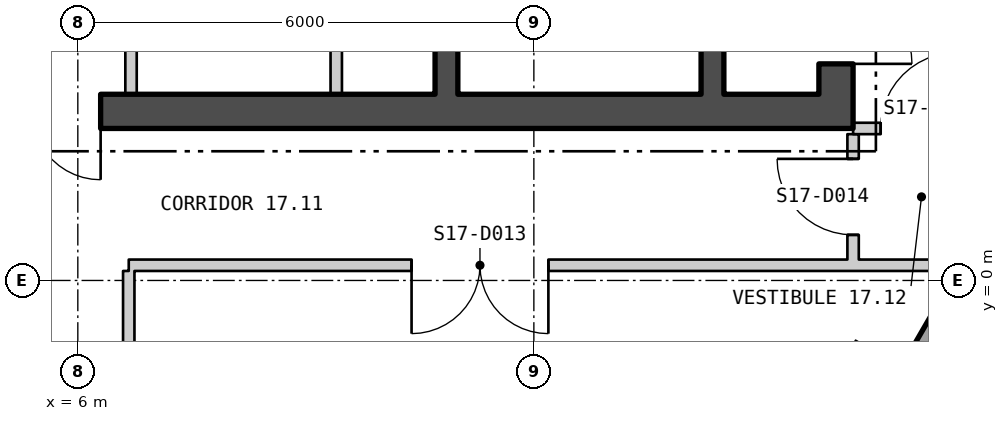
"""IFC4 building model, lengths in metres.
Left out: names, types, materials, properties, quantities, classifications, styles, units other than length and angle.
Written with IfcOpenShell. Run it as: python <this file> out.ifc"""

import sys

from ifc_helpers import new_model, si_unit, direction, frame, frame_2d, origin, origin_2d, place, context, subcontext, project, spatial, polyline, rectangle, hollow_rectangle, outline, extrude, element, fill, save


model = new_model("IFC4")
c1 = context("Model", 3, precision=1e-05, world=origin(), true_north=direction((0.0, 1.0)))
c2 = subcontext(c1, "Body", "Model", "MODEL_VIEW")
j1 = project(units=[si_unit("LENGTHUNIT", "METRE"), si_unit("PLANEANGLEUNIT", "RADIAN")], contexts=[c1])
p1 = place(None, origin())
s1 = spatial("IfcSite", under=j1, at=p1, CompositionType="ELEMENT")
p2 = place(p1, origin())
s2 = spatial("IfcBuilding", under=s1, at=p2, CompositionType="ELEMENT")
p3 = place(p2, frame((0.0, 0.0, 227.7)))
s3 = spatial("IfcBuildingStorey", under=s2, at=p3, CompositionType="ELEMENT", Elevation=227.7)
p4 = place(p3, frame((16.398, -1.196, 0.0), z_axis=(0.0, 0.0, 1.0), x_axis=(0.5, 0.866025403784, 0.0)))
e1 = element("IfcColumn", 1, at=p4, inside=s3, PredefinedType="COLUMN", context=c2, shape_type="SweptSolid", body=[
    extrude(hollow_rectangle(XDim=0.55, YDim=0.7, WallThickness=0.05, at=origin_2d()), origin(), (0.0, 0.0, 1.0), 3.9),
])
p5 = place(p3, frame((3.21, -25.189, -0.18), z_axis=(0.0, 0.0, 1.0), x_axis=(0.499999194392, 0.866025868902, 0.0)))
e2 = element("IfcWall", 2, at=p5, inside=s3, PredefinedType="SOLIDWALL", context=c2, shape_type="SweptSolid", body=[
    extrude(outline(polyline([(-0.13, -0.225), (45.86, -0.225), (45.6, 0.225), (0.13, 0.225), (-0.13, -0.225)])), origin(), (0.0, 0.0, 1.0), 3.68),
])
p6 = place(p5, frame((1.424, 0.0, 1.08)))
e3 = element("IfcOpeningElement", 3, at=p6, cuts=e2, PredefinedType="OPENING", context=c2, shape_type="SweptSolid", body=[
    extrude(rectangle(XDim=2.4, YDim=2.0, at=frame_2d((1.2, 1.0))), frame((0.0, 0.235, 0.0), z_axis=(0.0, -1.0, 0.0), x_axis=(1.0, 0.0, 0.0)), (0.0, 0.0, 1.0), 0.47),
])
p7 = place(p5, frame((5.892, 0.0, 1.08)))
e4 = element("IfcOpeningElement", 4, at=p7, cuts=e2, PredefinedType="OPENING", context=c2, shape_type="SweptSolid", body=[
    extrude(rectangle(XDim=2.4, YDim=2.0, at=frame_2d((1.2, 1.0))), frame((0.0, 0.235, 0.0), z_axis=(0.0, -1.0, 0.0), x_axis=(1.0, 0.0, 0.0)), (0.0, 0.0, 1.0), 0.47),
])
p8 = place(p5, frame((10.399, 0.0, 1.08)))
e5 = element("IfcOpeningElement", 5, at=p8, cuts=e2, PredefinedType="OPENING", context=c2, shape_type="SweptSolid", body=[
    extrude(rectangle(XDim=2.4, YDim=2.0, at=frame_2d((1.2, 1.0))), frame((0.0, 0.235, 0.0), z_axis=(0.0, -1.0, 0.0), x_axis=(1.0, 0.0, 0.0)), (0.0, 0.0, 1.0), 0.47),
])
p9 = place(p5, frame((14.905, 0.0, 1.08)))
e6 = element("IfcOpeningElement", 6, at=p9, cuts=e2, PredefinedType="OPENING", context=c2, shape_type="SweptSolid", body=[
    extrude(rectangle(XDim=2.4, YDim=2.0, at=frame_2d((1.2, 1.0))), frame((0.0, 0.235, 0.0), z_axis=(0.0, -1.0, 0.0), x_axis=(1.0, 0.0, 0.0)), (0.0, 0.0, 1.0), 0.47),
])
p10 = place(p5, frame((19.412, 0.0, 1.08)))
e7 = element("IfcOpeningElement", 7, at=p10, cuts=e2, PredefinedType="OPENING", context=c2, shape_type="SweptSolid", body=[
    extrude(rectangle(XDim=2.4, YDim=2.0, at=frame_2d((1.2, 1.0))), frame((0.0, 0.235, 0.0), z_axis=(0.0, -1.0, 0.0), x_axis=(1.0, 0.0, 0.0)), (0.0, 0.0, 1.0), 0.47),
])
p11 = place(p5, frame((23.918, 0.0, 1.08)))
e8 = element("IfcOpeningElement", 8, at=p11, cuts=e2, PredefinedType="OPENING", context=c2, shape_type="SweptSolid", body=[
    extrude(rectangle(XDim=2.4, YDim=2.0, at=frame_2d((1.2, 1.0))), frame((0.0, 0.235, 0.0), z_axis=(0.0, -1.0, 0.0), x_axis=(1.0, 0.0, 0.0)), (0.0, 0.0, 1.0), 0.47),
])
p12 = place(p5, frame((32.932, 0.0, 1.08)))
e9 = element("IfcOpeningElement", 9, at=p12, cuts=e2, PredefinedType="OPENING", context=c2, shape_type="SweptSolid", body=[
    extrude(rectangle(XDim=2.4, YDim=2.0, at=frame_2d((1.2, 1.0))), frame((0.0, 0.235, 0.0), z_axis=(0.0, -1.0, 0.0), x_axis=(1.0, 0.0, 0.0)), (0.0, 0.0, 1.0), 0.47),
])
p13 = place(p5, frame((37.438, 0.0, 1.08)))
e10 = element("IfcOpeningElement", 10, at=p13, cuts=e2, PredefinedType="OPENING", context=c2, shape_type="SweptSolid", body=[
    extrude(rectangle(XDim=2.4, YDim=2.0, at=frame_2d((1.2, 1.0))), frame((0.0, 0.235, 0.0), z_axis=(0.0, -1.0, 0.0), x_axis=(1.0, 0.0, 0.0)), (0.0, 0.0, 1.0), 0.47),
])
p14 = place(p5, frame((41.907, 0.0, 1.08)))
e11 = element("IfcOpeningElement", 11, at=p14, cuts=e2, PredefinedType="OPENING", context=c2, shape_type="SweptSolid", body=[
    extrude(rectangle(XDim=2.4, YDim=2.0, at=frame_2d((1.2, 1.0))), frame((0.0, 0.235, 0.0), z_axis=(0.0, -1.0, 0.0), x_axis=(1.0, 0.0, 0.0)), (0.0, 0.0, 1.0), 0.47),
])
p15 = place(p3, frame((-16.2, 2.225, 0.0), z_axis=(0.0, 0.0, 1.0), x_axis=(1.0, 0.0, 0.0)))
e12 = element("IfcWall", 12, at=p15, inside=s3, PredefinedType="SHEAR", context=c2, shape_type="SweptSolid", body=[
    extrude(rectangle(XDim=32.4, YDim=0.45, at=frame_2d((16.2, 0.0))), origin(), (0.0, 0.0, 1.0), 3.7),
])
p16 = place(p15, frame((10.7, 0.0, 0.0)))
e13 = element("IfcOpeningElement", 13, at=p16, cuts=e12, PredefinedType="OPENING", context=c2, shape_type="SweptSolid", body=[
    extrude(rectangle(XDim=1.8, YDim=2.4, at=frame_2d((0.9, 1.2))), frame((0.0, 0.235, 0.0), z_axis=(0.0, -1.0, 0.0), x_axis=(1.0, 0.0, 0.0)), (0.0, 0.0, 1.0), 0.47),
])
p17 = place(p15, frame((20.7, 0.0, 0.0)))
e14 = element("IfcOpeningElement", 14, at=p17, cuts=e12, PredefinedType="OPENING", context=c2, shape_type="SweptSolid", body=[
    extrude(rectangle(XDim=1.8, YDim=2.4, at=frame_2d((0.9, 1.2))), frame((0.0, 0.235, 0.0), z_axis=(0.0, -1.0, 0.0), x_axis=(1.0, 0.0, 0.0)), (0.0, 0.0, 1.0), 0.47),
])
p18 = place(p3, frame((15.975, 2.45, 0.0), z_axis=(0.0, 0.0, 1.0), x_axis=(0.0, 1.0, 0.0)))
e15 = element("IfcWall", 15, at=p18, inside=s3, PredefinedType="SHEAR", context=c2, shape_type="SweptSolid", body=[
    extrude(rectangle(XDim=15.1, YDim=0.45, at=frame_2d((7.55, 0.0))), origin(), (0.0, 0.0, 1.0), 3.7),
])
p19 = place(p18, frame((4.4, 0.0, 0.0)))
e16 = element("IfcOpeningElement", 16, at=p19, cuts=e15, PredefinedType="OPENING", context=c2, shape_type="SweptSolid", body=[
    extrude(rectangle(XDim=1.5, YDim=2.1, at=frame_2d((0.75, 1.05))), frame((0.0, 0.235, 0.0), z_axis=(0.0, -1.0, 0.0), x_axis=(1.0, 0.0, 0.0)), (0.0, 0.0, 1.0), 0.47),
])
p20 = place(p18, frame((0.4, 0.0, 0.0)))
e17 = element("IfcOpeningElement", 17, at=p20, cuts=e15, PredefinedType="OPENING", context=c2, shape_type="SweptSolid", body=[
    extrude(rectangle(XDim=1.0, YDim=2.1, at=frame_2d((0.5, 1.05))), frame((0.0, 0.235, 0.0), z_axis=(0.0, -1.0, 0.0), x_axis=(1.0, 0.0, 0.0)), (0.0, 0.0, 1.0), 0.47),
])
p21 = place(p18, frame((2.5, 0.0, 0.0)))
e18 = element("IfcOpeningElement", 18, at=p21, cuts=e15, PredefinedType="OPENING", context=c2, shape_type="SweptSolid", body=[
    extrude(rectangle(XDim=0.9, YDim=2.1, at=frame_2d((0.45, 1.05))), frame((0.0, 0.235, 0.0), z_axis=(0.0, -1.0, 0.0), x_axis=(1.0, 0.0, 0.0)), (0.0, 0.0, 1.0), 0.47),
])
p22 = place(p18, frame((9.071, 0.0, 0.0)))
e19 = element("IfcOpeningElement", 19, at=p22, cuts=e15, PredefinedType="OPENING", context=c2, shape_type="SweptSolid", body=[
    extrude(rectangle(XDim=0.9, YDim=2.1, at=frame_2d((0.45, 1.05))), frame((0.0, 0.235, 0.0), z_axis=(0.0, -1.0, 0.0), x_axis=(1.0, 0.0, 0.0)), (0.0, 0.0, 1.0), 0.47),
])
p23 = place(p18, frame((13.671, 0.0, 0.0)))
e20 = element("IfcOpeningElement", 20, at=p23, cuts=e15, PredefinedType="OPENING", context=c2, shape_type="SweptSolid", body=[
    extrude(rectangle(XDim=0.9, YDim=2.1, at=frame_2d((0.45, 1.05))), frame((0.0, 0.235, 0.0), z_axis=(0.0, -1.0, 0.0), x_axis=(1.0, 0.0, 0.0)), (0.0, 0.0, 1.0), 0.47),
])
p24 = place(p3, frame((10.85, 2.45, 0.0), z_axis=(0.0, 0.0, 1.0), x_axis=(0.0, 1.0, 0.0)))
e21 = element("IfcWall", 21, at=p24, inside=s3, PredefinedType="SHEAR", context=c2, shape_type="SweptSolid", body=[
    extrude(rectangle(XDim=15.1, YDim=0.3, at=frame_2d((7.55, 0.0))), origin(), (0.0, 0.0, 1.0), 3.7),
])
p25 = place(p24, frame((3.525, 0.0, 0.0)))
e22 = element("IfcOpeningElement", 22, at=p25, cuts=e21, PredefinedType="OPENING", context=c2, shape_type="SweptSolid", body=[
    extrude(rectangle(XDim=1.25, YDim=2.1, at=frame_2d((0.625, 1.05))), frame((0.0, 0.16, 0.0), z_axis=(0.0, -1.0, 0.0), x_axis=(1.0, 0.0, 0.0)), (0.0, 0.0, 1.0), 0.32),
])
p26 = place(p24, frame((1.15, 0.0, 0.0)))
e23 = element("IfcOpeningElement", 23, at=p26, cuts=e21, PredefinedType="OPENING", context=c2, shape_type="SweptSolid", body=[
    extrude(rectangle(XDim=1.0, YDim=2.1, at=frame_2d((0.5, 1.05))), frame((0.0, 0.16, 0.0), z_axis=(0.0, -1.0, 0.0), x_axis=(1.0, 0.0, 0.0)), (0.0, 0.0, 1.0), 0.32),
])
p27 = place(p3, frame((14.35, 2.45, 0.0), z_axis=(0.0, 0.0, 1.0), x_axis=(0.0, 1.0, 0.0)))
e24 = element("IfcWall", 24, at=p27, inside=s3, PredefinedType="SHEAR", context=c2, shape_type="SweptSolid", body=[
    extrude(rectangle(XDim=15.1, YDim=0.3, at=frame_2d((7.55, 0.0))), origin(), (0.0, 0.0, 1.0), 3.7),
])
p28 = place(p27, frame((4.4, 0.0, 0.0)))
e25 = element("IfcOpeningElement", 25, at=p28, cuts=e24, PredefinedType="OPENING", context=c2, shape_type="SweptSolid", body=[
    extrude(rectangle(XDim=1.5, YDim=2.1, at=frame_2d((0.75, 1.05))), frame((0.0, 0.16, 0.0), z_axis=(0.0, -1.0, 0.0), x_axis=(1.0, 0.0, 0.0)), (0.0, 0.0, 1.0), 0.32),
])
for number, where, z_axis, x_axis in (
    (26, (6.7, 2.45, 0.0), (0.0, 0.0, 1.0), (0.0, 1.0, 0.0)),
    (27, (9.4, 2.45, 0.0), (0.0, 0.0, 1.0), (0.0, 1.0, 0.0)),
):
    element("IfcWall", number, at=place(p3, frame(where, z_axis=z_axis, x_axis=x_axis)), inside=s3, PredefinedType="PARTITIONING", context=c2, shape_type="SweptSolid", body=[
        extrude(rectangle(XDim=3.575, YDim=0.15, at=frame_2d((1.788, 0.0))), origin(), (0.0, 0.0, 1.0), 3.7),
    ])
p29 = place(p3, frame((6.67, -1.125, 0.0), z_axis=(0.0, 0.0, 1.0), x_axis=(0.0, 1.0, 0.0)))
e28 = element("IfcWall", 28, at=p29, inside=s3, PredefinedType="PARTITIONING", context=c2, shape_type="SweptSolid", body=[
    extrude(rectangle(XDim=1.25, YDim=0.15, at=frame_2d((0.625, 0.0))), origin(), (0.0, 0.0, 1.0), 3.7),
])
p30 = place(p3, frame((6.67, 0.2, 0.0), z_axis=(0.0, 0.0, 1.0), x_axis=(1.0, 0.0, 0.0)))
e29 = element("IfcWall", 29, at=p30, inside=s3, PredefinedType="PARTITIONING", context=c2, shape_type="SweptSolid", body=[
    extrude(rectangle(XDim=10.938, YDim=0.15, at=frame_2d((5.469, 0.0))), origin(), (0.0, 0.0, 1.0), 3.7),
])
p31 = place(p30, frame((3.721, 0.0, 0.0)))
e30 = element("IfcOpeningElement", 30, at=p31, cuts=e29, PredefinedType="OPENING", context=c2, shape_type="SweptSolid", body=[
    extrude(rectangle(XDim=1.8, YDim=2.1, at=frame_2d((0.9, 1.05))), frame((0.0, 0.085, 0.0), z_axis=(0.0, -1.0, 0.0), x_axis=(1.0, 0.0, 0.0)), (0.0, 0.0, 1.0), 0.17),
])
p32 = place(p3, frame((16.2, 0.275, 0.0), z_axis=(0.0, 0.0, 1.0), x_axis=(0.0, 1.0, 0.0)))
e31 = element("IfcWall", 31, at=p32, inside=s3, PredefinedType="PARTITIONING", context=c2, shape_type="SweptSolid", body=[
    extrude(rectangle(XDim=1.65, YDim=0.15, at=frame_2d((0.825, 0.0))), origin(), (0.0, 0.0, 1.0), 3.7),
])
p33 = place(p32, frame((0.325, 0.0, 0.0)))
e32 = element("IfcOpeningElement", 32, at=p33, cuts=e31, PredefinedType="OPENING", context=c2, shape_type="SweptSolid", body=[
    extrude(rectangle(XDim=1.0, YDim=2.1, at=frame_2d((0.5, 1.05))), frame((0.0, 0.085, 0.0), z_axis=(0.0, -1.0, 0.0), x_axis=(1.0, 0.0, 0.0)), (0.0, 0.0, 1.0), 0.17),
])
p34 = place(p3, frame((16.2, 2.0, 0.0), z_axis=(0.0, 0.0, 1.0), x_axis=(1.0, 0.0, 0.0)))
e33 = element("IfcWall", 33, at=p34, inside=s3, PredefinedType="PARTITIONING", context=c2, shape_type="SweptSolid", body=[
    extrude(rectangle(XDim=1.725, YDim=0.15, at=frame_2d((0.863, 0.0))), origin(), (0.0, 0.0, 1.0), 3.11),
])
p35 = place(p34, frame((0.363, 0.0, 0.0)))
e34 = element("IfcOpeningElement", 34, at=p35, cuts=e33, PredefinedType="OPENING", context=c2, shape_type="SweptSolid", body=[
    extrude(rectangle(XDim=1.0, YDim=2.1, at=frame_2d((0.5, 1.05))), frame((0.0, 0.085, 0.0), z_axis=(0.0, -1.0, 0.0), x_axis=(1.0, 0.0, 0.0)), (0.0, 0.0, 1.0), 0.17),
])
p36 = place(p20, origin())
e35 = element("IfcDoor", 35, at=p36, inside=s3, OperationType="SINGLE_SWING_LEFT", PredefinedType="DOOR", context=c2, shape_type="SweptSolid", body=[
    extrude(rectangle(XDim=1.0, YDim=2.1, at=frame_2d((0.5, 1.05))), frame((0.0, 0.025, 0.0), z_axis=(0.0, -1.0, 0.0), x_axis=(1.0, 0.0, 0.0)), (0.0, 0.0, 1.0), 0.05),
])
fill(e17, e35)
p37 = place(p17, origin())
e36 = element("IfcDoor", 36, at=p37, inside=s3, OperationType="DOUBLE_DOOR_SINGLE_SWING", PredefinedType="DOOR", context=c2, shape_type="SweptSolid", body=[
    extrude(rectangle(XDim=1.8, YDim=2.4, at=frame_2d((0.9, 1.2))), frame((0.0, 0.025, 0.0), z_axis=(0.0, -1.0, 0.0), x_axis=(1.0, 0.0, 0.0)), (0.0, 0.0, 1.0), 0.05),
])
fill(e14, e36)
p38 = place(p31, origin())
e37 = element("IfcDoor", 37, at=p38, inside=s3, OperationType="DOUBLE_DOOR_SINGLE_SWING", PredefinedType="DOOR", context=c2, shape_type="SweptSolid", body=[
    extrude(rectangle(XDim=1.8, YDim=2.1, at=frame_2d((0.9, 1.05))), frame((0.0, 0.025, 0.0), z_axis=(0.0, -1.0, 0.0), x_axis=(1.0, 0.0, 0.0)), (0.0, 0.0, 1.0), 0.05),
])
fill(e30, e37)
p39 = place(p33, origin())
e38 = element("IfcDoor", 38, at=p39, inside=s3, OperationType="SINGLE_SWING_LEFT", PredefinedType="DOOR", context=c2, shape_type="SweptSolid", body=[
    extrude(rectangle(XDim=1.0, YDim=2.1, at=frame_2d((0.5, 1.05))), frame((0.0, 0.025, 0.0), z_axis=(0.0, -1.0, 0.0), x_axis=(1.0, 0.0, 0.0)), (0.0, 0.0, 1.0), 0.05),
])
fill(e32, e38)
p40 = place(p35, origin())
e39 = element("IfcDoor", 39, at=p40, inside=s3, OperationType="SINGLE_SWING_LEFT", PredefinedType="DOOR", context=c2, shape_type="SweptSolid", body=[
    extrude(rectangle(XDim=1.0, YDim=2.1, at=frame_2d((0.5, 1.05))), frame((0.0, 0.025, 0.0), z_axis=(0.0, -1.0, 0.0), x_axis=(1.0, 0.0, 0.0)), (0.0, 0.0, 1.0), 0.05),
])
fill(e34, e39)
save(model, sys.argv[1])
